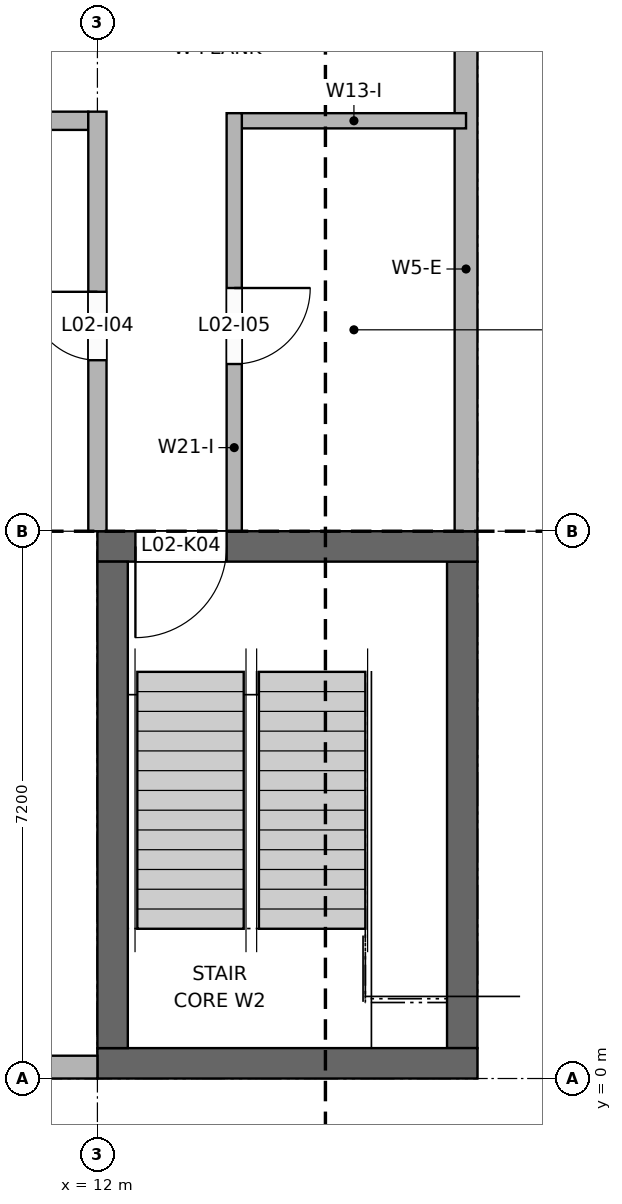
"""IFC4 building model, lengths in metres.
Left out: names, types, materials, properties, quantities, classifications, styles, units other than length and angle.
Written with IfcOpenShell. Run it as: python <this file> out.ifc"""

import sys

from ifc_helpers import new_model, si_unit, direction, frame, frame_2d, origin, place, context, subcontext, project, spatial, rectangle, extrude, element, fill, save


model = new_model("IFC4")
c1 = context("Model", 3, precision=1e-05, world=origin(), true_north=direction((0.0, 1.0)))
c2 = subcontext(c1, "Body", "Model", "MODEL_VIEW")
j1 = project(units=[si_unit("LENGTHUNIT", "METRE"), si_unit("PLANEANGLEUNIT", "RADIAN")], contexts=[c1])
p1 = place(None, origin())
s1 = spatial("IfcSite", under=j1, at=p1, CompositionType="ELEMENT")
p2 = place(p1, origin())
s2 = spatial("IfcBuilding", under=s1, at=p2, CompositionType="ELEMENT")
p3 = place(p2, frame((0.0, 0.0, 8.4)))
s3 = spatial("IfcBuildingStorey", under=s2, at=p3, CompositionType="ELEMENT", Elevation=8.4)
p4 = place(p3, frame((12.0, 0.2, 0.0), z_axis=(0.0, 0.0, 1.0), x_axis=(1.0, 0.0, 0.0)))
e1 = element("IfcWall", 1, at=p4, inside=s3, PredefinedType="SHEAR", context=c2, shape_type="SweptSolid", body=[
    extrude(rectangle(XDim=5.0, YDim=0.4, at=frame_2d((2.5, 0.0))), origin(), (0.0, 0.0, 1.0), 3.95),
])
p5 = place(p3, frame((12.0, 7.0, 0.0), z_axis=(0.0, 0.0, 1.0), x_axis=(1.0, 0.0, 0.0)))
e2 = element("IfcWall", 2, at=p5, inside=s3, PredefinedType="SHEAR", context=c2, shape_type="SweptSolid", body=[
    extrude(rectangle(XDim=5.0, YDim=0.4, at=frame_2d((2.5, 0.0))), origin(), (0.0, 0.0, 1.0), 3.95),
])
p6 = place(p5, frame((0.5, 0.0, 0.0)))
e3 = element("IfcOpeningElement", 3, at=p6, cuts=e2, PredefinedType="OPENING", context=c2, shape_type="SweptSolid", body=[
    extrude(rectangle(XDim=1.2, YDim=2.1, at=frame_2d((0.6, 1.05))), frame((0.0, 0.21, 0.0), z_axis=(0.0, -1.0, 0.0), x_axis=(1.0, 0.0, 0.0)), (0.0, 0.0, 1.0), 0.42),
])
for number, where, z_axis, x_axis in (
    (4, (12.2, 0.4, 0.0), (0.0, 0.0, 1.0), (0.0, 1.0, 0.0)),
    (5, (16.8, 0.4, 0.0), (0.0, 0.0, 1.0), (0.0, 1.0, 0.0)),
):
    element("IfcWall", number, at=place(p3, frame(where, z_axis=z_axis, x_axis=x_axis)), inside=s3, PredefinedType="SHEAR", context=c2, shape_type="SweptSolid", body=[
        extrude(rectangle(XDim=6.4, YDim=0.4, at=frame_2d((3.2, 0.0))), origin(), (0.0, 0.0, 1.0), 3.95),
    ])
p7 = place(p3, frame((6.3, 0.15, 0.0), z_axis=(0.0, 0.0, 1.0), x_axis=(1.0, 0.0, 0.0)))
e6 = element("IfcWall", 6, at=p7, inside=s3, PredefinedType="SOLIDWALL", context=c2, shape_type="SweptSolid", body=[
    extrude(rectangle(XDim=5.7, YDim=0.3, at=frame_2d((2.85, 0.0))), origin(), (0.0, 0.0, 1.0), 3.15),
])
p8 = place(p7, frame((1.665, 0.0, 0.9)))
e7 = element("IfcOpeningElement", 7, at=p8, cuts=e6, PredefinedType="OPENING", context=c2, shape_type="SweptSolid", body=[
    extrude(rectangle(XDim=1.1, YDim=1.5, at=frame_2d((0.55, 0.75))), frame((0.0, 0.16, 0.0), z_axis=(0.0, -1.0, 0.0), x_axis=(1.0, 0.0, 0.0)), (0.0, 0.0, 1.0), 0.32),
])
p9 = place(p3, frame((16.85, 7.2, 0.0), z_axis=(0.0, 0.0, 1.0), x_axis=(0.0, 1.0, 0.0)))
e8 = element("IfcWall", 8, at=p9, inside=s3, PredefinedType="SOLIDWALL", context=c2, shape_type="SweptSolid", body=[
    extrude(rectangle(XDim=6.9, YDim=0.3, at=frame_2d((3.45, 0.0))), origin(), (0.0, 0.0, 1.0), 3.15),
])
p10 = place(p3, frame((12.0, 7.2, 0.0), z_axis=(0.0, 0.0, 1.0), x_axis=(0.0, 1.0, 0.0)))
e9 = element("IfcWall", 9, at=p10, inside=s3, PredefinedType="PARTITIONING", context=c2, shape_type="SweptSolid", body=[
    extrude(rectangle(XDim=5.52, YDim=0.24, at=frame_2d((2.76, 0.0))), origin(), (0.0, 0.0, 1.0), 3.15),
])
p11 = place(p10, frame((2.25, 0.0, 0.0)))
e10 = element("IfcOpeningElement", 10, at=p11, cuts=e9, PredefinedType="OPENING", context=c2, shape_type="SweptSolid", body=[
    extrude(rectangle(XDim=0.9, YDim=2.1, at=frame_2d((0.45, 1.05))), frame((0.0, 0.13, 0.0), z_axis=(0.0, -1.0, 0.0), x_axis=(1.0, 0.0, 0.0)), (0.0, 0.0, 1.0), 0.26),
])
p12 = place(p3, frame((13.8, 7.2, 0.0), z_axis=(0.0, 0.0, 1.0), x_axis=(0.0, 1.0, 0.0)))
e11 = element("IfcWall", 11, at=p12, inside=s3, PredefinedType="PARTITIONING", context=c2, shape_type="SweptSolid", body=[
    extrude(rectangle(XDim=5.5, YDim=0.2, at=frame_2d((2.75, 0.0))), origin(), (0.0, 0.0, 1.0), 3.95),
])
p13 = place(p12, frame((2.2, 0.0, 0.0)))
e12 = element("IfcOpeningElement", 12, at=p13, cuts=e11, PredefinedType="OPENING", context=c2, shape_type="SweptSolid", body=[
    extrude(rectangle(XDim=1.0, YDim=2.1, at=frame_2d((0.5, 1.05))), frame((0.0, 0.11, 0.0), z_axis=(0.0, -1.0, 0.0), x_axis=(1.0, 0.0, 0.0)), (0.0, 0.0, 1.0), 0.22),
])
p14 = place(p3, frame((9.92, 12.6, 0.0), z_axis=(0.0, 0.0, 1.0), x_axis=(1.0, 0.0, 0.0)))
e13 = element("IfcWall", 13, at=p14, inside=s3, PredefinedType="PARTITIONING", context=c2, shape_type="SweptSolid", body=[
    extrude(rectangle(XDim=1.96, YDim=0.24, at=frame_2d((0.98, 0.0))), origin(), (0.0, 0.0, 1.0), 3.15),
])
p15 = place(p3, frame((13.9, 12.6, 0.0), z_axis=(0.0, 0.0, 1.0), x_axis=(1.0, 0.0, 0.0)))
e14 = element("IfcWall", 14, at=p15, inside=s3, PredefinedType="PARTITIONING", context=c2, shape_type="SweptSolid", body=[
    extrude(rectangle(XDim=2.95, YDim=0.2, at=frame_2d((1.475, 0.0))), origin(), (0.0, 0.0, 1.0), 3.15),
])
p16 = place(p6, frame((1.2, 0.0, 0.0), z_axis=(0.0, 0.0, 1.0), x_axis=(-1.0, 0.0, 0.0)))
e15 = element("IfcDoor", 15, at=p16, inside=s3, OperationType="SINGLE_SWING_RIGHT", PredefinedType="DOOR", context=c2, shape_type="SweptSolid", body=[
    extrude(rectangle(XDim=1.2, YDim=2.1, at=frame_2d((0.6, 1.05))), frame((0.0, 0.025, 0.0), z_axis=(0.0, -1.0, 0.0), x_axis=(1.0, 0.0, 0.0)), (0.0, 0.0, 1.0), 0.05),
])
fill(e3, e15)
p17 = place(p11, origin())
e16 = element("IfcDoor", 16, at=p17, inside=s3, OperationType="SINGLE_SWING_RIGHT", PredefinedType="DOOR", context=c2, shape_type="SweptSolid", body=[
    extrude(rectangle(XDim=0.9, YDim=2.1, at=frame_2d((0.45, 1.05))), frame((0.0, 0.025, 0.0), z_axis=(0.0, -1.0, 0.0), x_axis=(1.0, 0.0, 0.0)), (0.0, 0.0, 1.0), 0.05),
])
fill(e10, e16)
p18 = place(p13, frame((1.0, 0.0, 0.0), z_axis=(0.0, 0.0, 1.0), x_axis=(-1.0, 0.0, 0.0)))
e17 = element("IfcDoor", 17, at=p18, inside=s3, OperationType="SINGLE_SWING_LEFT", PredefinedType="DOOR", context=c2, shape_type="SweptSolid", body=[
    extrude(rectangle(XDim=1.0, YDim=2.1, at=frame_2d((0.5, 1.05))), frame((0.0, 0.025, 0.0), z_axis=(0.0, -1.0, 0.0), x_axis=(1.0, 0.0, 0.0)), (0.0, 0.0, 1.0), 0.05),
])
fill(e12, e17)
save(model, sys.argv[1])
